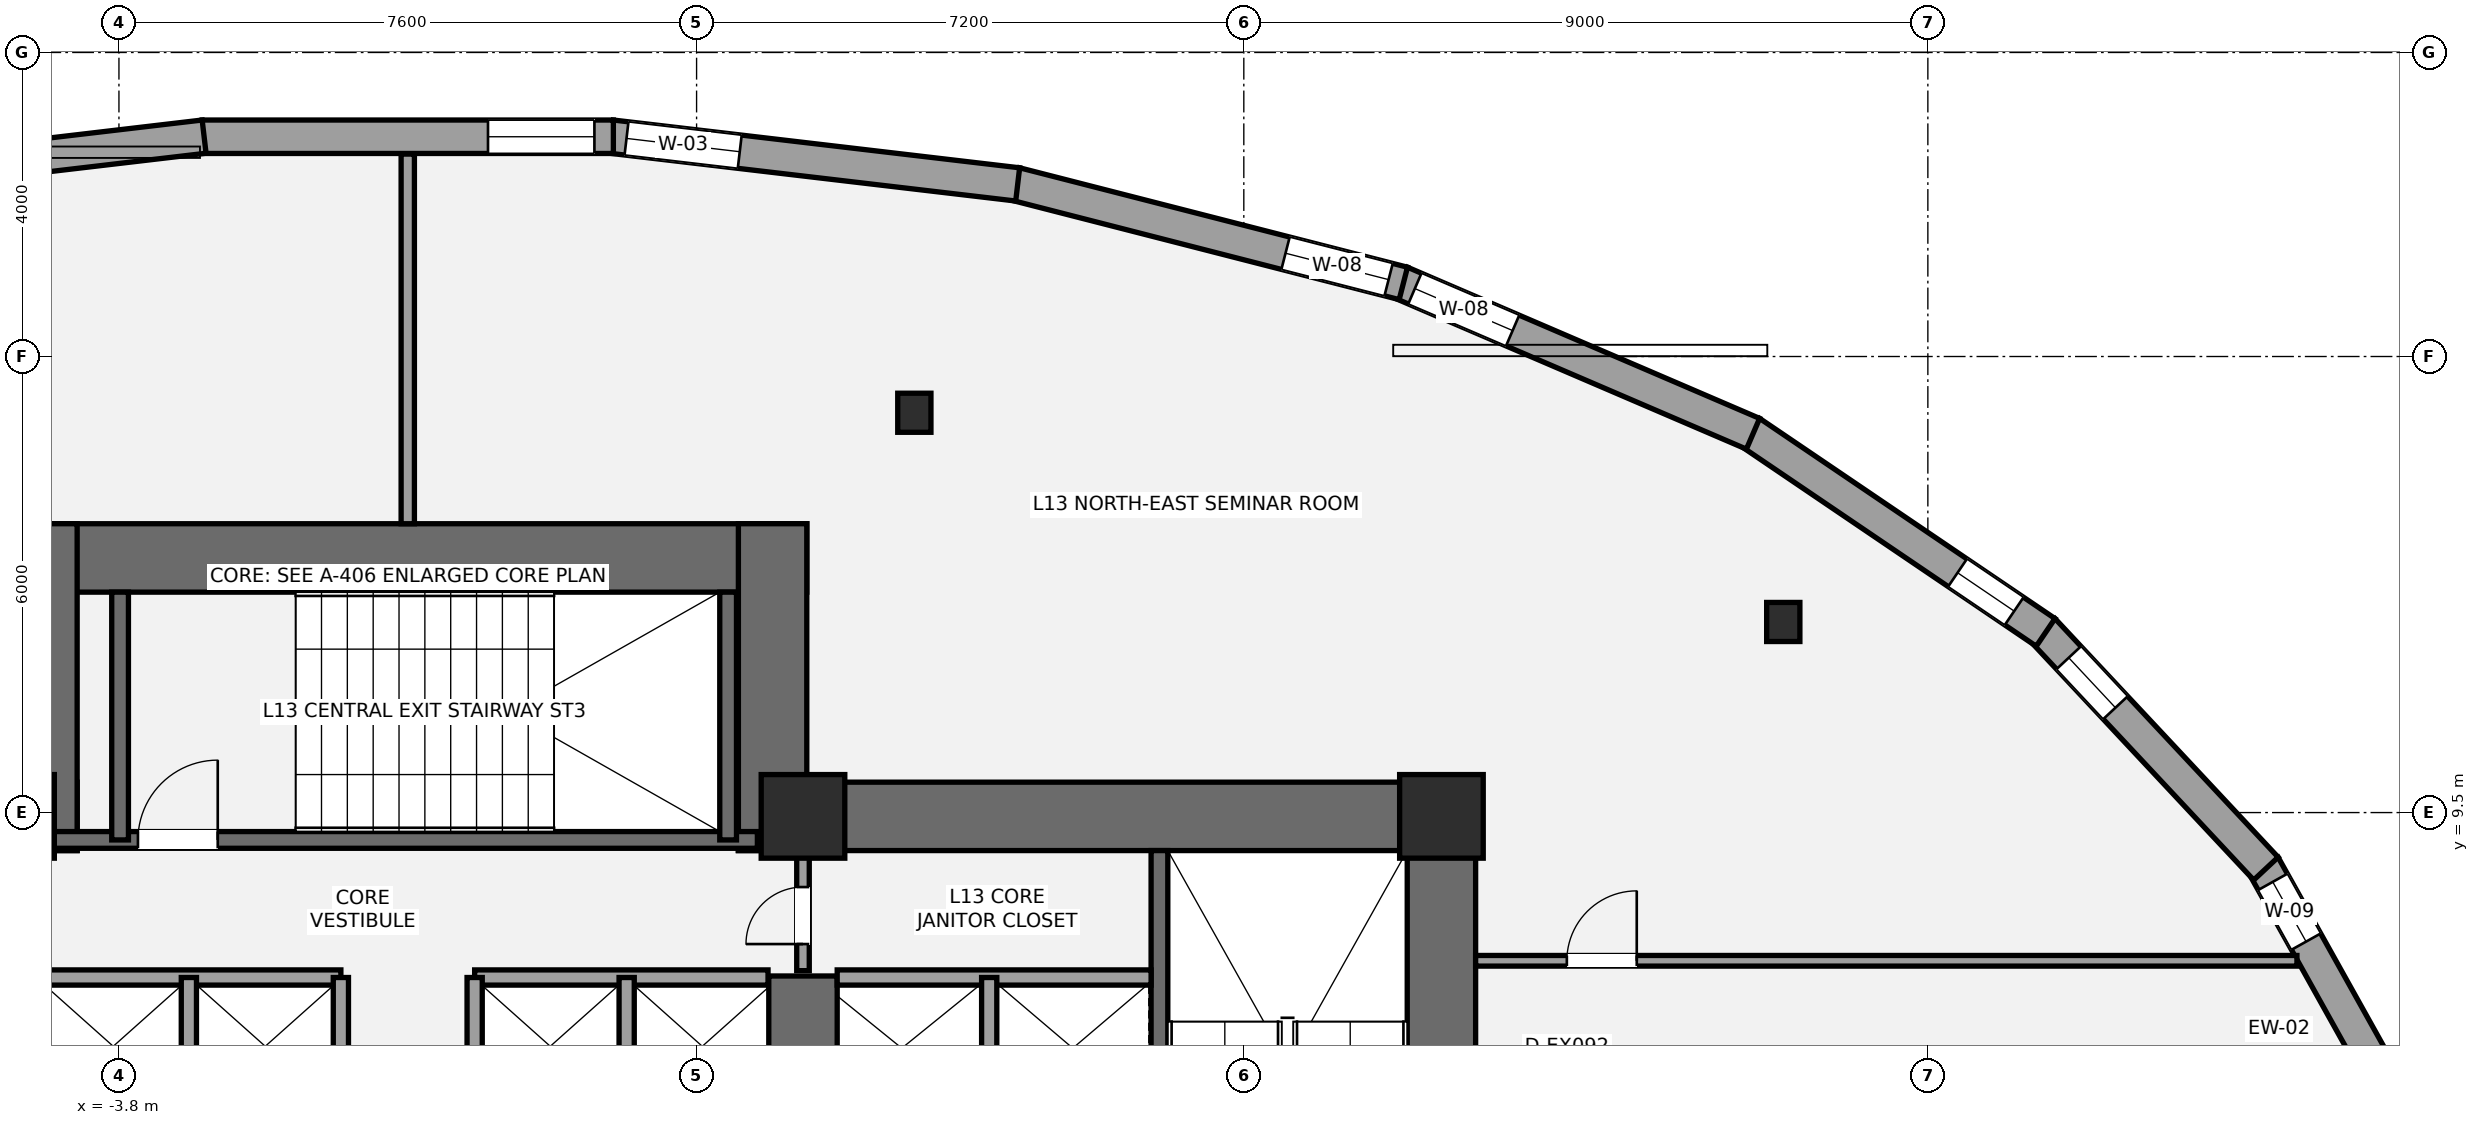
"""IFC4 building model, lengths in metres.
Left out: names, types, materials, properties, quantities, classifications, styles, units other than length and angle.
Written with IfcOpenShell. Run it as: python <this file> out.ifc"""

import sys

from ifc_helpers import new_model, si_unit, direction, frame, frame_2d, origin, origin_2d, place, context, subcontext, project, spatial, rectangle, i_section, extrude, element, fill, save


model = new_model("IFC4")
c1 = context("Model", 3, precision=1e-05, world=origin(), true_north=direction((0.0, 1.0)))
c2 = subcontext(c1, "Body", "Model", "MODEL_VIEW")
j1 = project(units=[si_unit("LENGTHUNIT", "METRE"), si_unit("PLANEANGLEUNIT", "RADIAN")], contexts=[c1])
p1 = place(None, origin())
s1 = spatial("IfcSite", under=j1, at=p1, CompositionType="ELEMENT")
p2 = place(p1, origin())
s2 = spatial("IfcBuilding", under=s1, at=p2, CompositionType="ELEMENT")
p3 = place(p2, frame((0.0, 0.0, 52.2)))
s3 = spatial("IfcBuildingStorey", under=s2, at=p3, CompositionType="ELEMENT", Elevation=52.2)
p4 = place(p3, frame((-14.05, 9.45, 0.0), z_axis=(0.0, 0.0, 1.0), x_axis=(1.0, 0.0, 0.0)))
e1 = element("IfcWall", 1, at=p4, inside=s3, PredefinedType="SHEAR", context=c2, shape_type="SweptSolid", body=[
    extrude(rectangle(XDim=9.7, YDim=0.9, at=frame_2d((4.85, 0.0))), origin(), (0.0, 0.0, 1.0), 3.6),
])
p5 = place(p3, frame((13.6, 0.95, 0.0), z_axis=(0.0, 0.0, 1.0), x_axis=(0.0, 1.0, 0.0)))
e2 = element("IfcWall", 2, at=p5, inside=s3, PredefinedType="SHEAR", context=c2, shape_type="SweptSolid", body=[
    extrude(rectangle(XDim=8.95, YDim=0.9, at=frame_2d((4.475, 0.0))), origin(), (0.0, 0.0, 1.0), 3.6),
])
p6 = place(p3, frame((4.35, 9.45, 0.0), z_axis=(0.0, 0.0, 1.0), x_axis=(1.0, 0.0, 0.0)))
e3 = element("IfcWall", 3, at=p6, inside=s3, PredefinedType="SHEAR", context=c2, shape_type="SweptSolid", body=[
    extrude(rectangle(XDim=9.7, YDim=0.9, at=frame_2d((4.85, 0.0))), origin(), (0.0, 0.0, 1.0), 3.6),
])
p7 = place(p3, frame((5.2, 5.35, 0.0), z_axis=(0.0, 0.0, 1.0), x_axis=(0.0, 1.0, 0.0)))
e4 = element("IfcWall", 4, at=p7, inside=s3, PredefinedType="SHEAR", context=c2, shape_type="SweptSolid", body=[
    extrude(rectangle(XDim=2.0, YDim=0.9, at=frame_2d((1.0, 0.0))), origin(), (0.0, 0.0, 1.0), 3.6),
])
p8 = place(p3, frame((9.89, 1.85, 0.0), z_axis=(0.0, 0.0, 1.0), x_axis=(0.0, 1.0, 0.0)))
e5 = element("IfcWall", 5, at=p8, inside=s3, PredefinedType="SHEAR", context=c2, shape_type="SweptSolid", body=[
    extrude(rectangle(XDim=7.15, YDim=0.22, at=frame_2d((3.575, 0.0))), origin(), (0.0, 0.0, 1.0), 3.6),
])
p9 = place(p3, frame((-5.25, 12.85, 0.0), z_axis=(0.0, 0.0, 1.0), x_axis=(1.0, 0.0, 0.0)))
e6 = element("IfcWall", 6, at=p9, inside=s3, PredefinedType="SHEAR", context=c2, shape_type="SweptSolid", body=[
    extrude(rectangle(XDim=10.5, YDim=0.9, at=frame_2d((5.25, 0.0))), origin(), (0.0, 0.0, 1.0), 3.6),
])
for number, where, z_axis, x_axis in (
    (7, (-4.8, 9.0, 0.0), (0.0, 0.0, 1.0), (0.0, 1.0, 0.0)),
    (8, (4.8, 9.0, 0.0), (0.0, 0.0, 1.0), (0.0, 1.0, 0.0)),
):
    element("IfcWall", number, at=place(p3, frame(where, z_axis=z_axis, x_axis=x_axis)), inside=s3, PredefinedType="SHEAR", context=c2, shape_type="SweptSolid", body=[
        extrude(rectangle(XDim=4.3, YDim=0.9, at=frame_2d((2.15, 0.0))), origin(), (0.0, 0.0, 1.0), 3.6),
    ])
p10 = place(p3, frame((-4.7, 9.14, 0.0), z_axis=(0.0, 0.0, 1.0), x_axis=(1.0, 0.0, 0.0)))
e9 = element("IfcWall", 9, at=p10, inside=s3, PredefinedType="SHEAR", context=c2, shape_type="SweptSolid", body=[
    extrude(rectangle(XDim=9.3, YDim=0.22, at=frame_2d((4.65, 0.0))), origin(), (0.0, 0.0, 1.0), 3.6),
])
p11 = place(p10, frame((1.15, 0.0, 0.0)))
e10 = element("IfcOpeningElement", 10, at=p11, cuts=e9, PredefinedType="OPENING", context=c2, shape_type="SweptSolid", body=[
    extrude(rectangle(XDim=1.05, YDim=2.15, at=frame_2d((0.525, 1.075))), frame((0.0, 0.12, 0.0), z_axis=(0.0, -1.0, 0.0), x_axis=(1.0, 0.0, 0.0)), (0.0, 0.0, 1.0), 0.24),
])
for number, where, z_axis, x_axis in (
    (11, (-3.785, 9.14, 0.0), (0.0, 0.0, 1.0), (0.0, 1.0, 0.0)),
    (12, (4.215, 9.14, 0.0), (0.0, 0.0, 1.0), (0.0, 1.0, 0.0)),
):
    element("IfcWall", number, at=place(p3, frame(where, z_axis=z_axis, x_axis=x_axis)), inside=s3, PredefinedType="SHEAR", context=c2, shape_type="SweptSolid", body=[
        extrude(rectangle(XDim=3.26, YDim=0.22, at=frame_2d((1.63, 0.0))), origin(), (0.0, 0.0, 1.0), 3.6),
    ])
for number, where, z_axis, x_axis in (
    (13, (-5.2, 9.45, 0.0), (0.0, 0.0, 1.0), (1.0, 0.0, 0.0)),
    (14, (5.2, 9.45, 0.0), (0.0, 0.0, 1.0), (1.0, 0.0, 0.0)),
    (15, (13.6, 9.45, 0.0), (0.0, 0.0, 1.0), (1.0, 0.0, 0.0)),
):
    element("IfcColumn", number, at=place(p3, frame(where, z_axis=z_axis, x_axis=x_axis)), inside=s3, PredefinedType="COLUMN", context=c2, shape_type="SweptSolid", body=[
        extrude(rectangle(XDim=1.1, YDim=1.1, at=origin_2d()), origin(), (0.0, 0.0, 1.0), 3.6),
    ])
for number, where, z_axis, x_axis in (
    (16, (18.098, 12.007, 0.0), (0.0, 0.0, 1.0), (1.0, 0.0, 0.0)),
    (17, (6.665, 14.76, 0.0), (0.0, 0.0, 1.0), (1.0, 0.0, 0.0)),
):
    element("IfcColumn", number, at=place(p3, frame(where, z_axis=z_axis, x_axis=x_axis)), inside=s3, PredefinedType="COLUMN", context=c2, shape_type="SweptSolid", body=[
        extrude(i_section(OverallWidth=0.437, OverallDepth=0.514, WebThickness=0.061, FlangeThickness=0.097, at=origin_2d()), origin(), (0.0, 0.0, 1.0), 3.6),
    ])
p12 = place(p3, frame((24.416, 8.806, 0.0), z_axis=(0.0, 0.0, 1.0), x_axis=(0.487369438963, -0.873195871477, 0.0)))
e18 = element("IfcWall", 18, at=p12, inside=s3, PredefinedType="STANDARD", context=c2, shape_type="SweptSolid", body=[
    extrude(rectangle(XDim=3.96, YDim=0.44, at=frame_2d((1.98, 0.0))), origin(), (0.0, 0.0, 1.0), 2.533),
])
p13 = place(p12, frame((0.249, 0.0, 0.92)))
e19 = element("IfcOpeningElement", 19, at=p13, cuts=e18, PredefinedType="OPENING", context=c2, shape_type="SweptSolid", body=[
    extrude(rectangle(XDim=0.9, YDim=1.35, at=frame_2d((0.45, 0.675))), frame((0.0, 0.23, 0.0), z_axis=(0.0, -1.0, 0.0), x_axis=(1.0, 0.0, 0.0)), (0.0, 0.0, 1.0), 0.46),
])
p14 = place(p3, frame((21.512, 11.902, 0.0), z_axis=(0.0, 0.0, 1.0), x_axis=(0.68299392258, -0.730424056093, 0.0)))
e20 = element("IfcWall", 20, at=p14, inside=s3, PredefinedType="STANDARD", context=c2, shape_type="SweptSolid", body=[
    extrude(rectangle(XDim=4.298, YDim=0.44, at=frame_2d((2.149, 0.0))), origin(), (0.0, 0.0, 1.0), 2.533),
])
p15 = place(p14, frame((0.5, 0.0, 0.58)))
e21 = element("IfcOpeningElement", 21, at=p15, cuts=e20, PredefinedType="OPENING", context=c2, shape_type="SweptSolid", body=[
    extrude(rectangle(XDim=0.9, YDim=1.35, at=frame_2d((0.45, 0.675))), frame((0.0, 0.23, 0.0), z_axis=(0.0, -1.0, 0.0), x_axis=(1.0, 0.0, 0.0)), (0.0, 0.0, 1.0), 0.46),
])
p16 = place(p3, frame((17.663, 14.504, 0.0), z_axis=(0.0, 0.0, 1.0), x_axis=(0.827825981515, -0.560984976919, 0.0)))
e22 = element("IfcWall", 22, at=p16, inside=s3, PredefinedType="STANDARD", context=c2, shape_type="SweptSolid", body=[
    extrude(rectangle(XDim=4.695, YDim=0.44, at=frame_2d((2.347, 0.0))), origin(), (0.0, 0.0, 1.0), 2.533),
])
p17 = place(p16, frame((3.295, 0.0, 0.58)))
e23 = element("IfcOpeningElement", 23, at=p17, cuts=e22, PredefinedType="OPENING", context=c2, shape_type="SweptSolid", body=[
    extrude(rectangle(XDim=0.9, YDim=1.35, at=frame_2d((0.45, 0.675))), frame((0.0, 0.23, 0.0), z_axis=(0.0, -1.0, 0.0), x_axis=(1.0, 0.0, 0.0)), (0.0, 0.0, 1.0), 0.46),
])
p18 = place(p3, frame((13.067, 16.473, 0.0), z_axis=(0.0, 0.0, 1.0), x_axis=(0.918881850071, -0.394532819433, 0.0)))
e24 = element("IfcWall", 24, at=p18, inside=s3, PredefinedType="STANDARD", context=c2, shape_type="SweptSolid", body=[
    extrude(rectangle(XDim=5.042, YDim=0.44, at=frame_2d((2.521, 0.0))), origin(), (0.0, 0.0, 1.0), 2.533),
])
p19 = place(p18, frame((0.2, 0.0, 0.58)))
e25 = element("IfcOpeningElement", 25, at=p19, cuts=e24, PredefinedType="OPENING", context=c2, shape_type="SweptSolid", body=[
    extrude(rectangle(XDim=1.4, YDim=1.55, at=frame_2d((0.7, 0.775))), frame((0.0, 0.23, 0.0), z_axis=(0.0, -1.0, 0.0), x_axis=(1.0, 0.0, 0.0)), (0.0, 0.0, 1.0), 0.46),
])
p20 = place(p3, frame((7.996, 17.77, 0.0), z_axis=(0.0, 0.0, 1.0), x_axis=(0.968705592422, -0.248212560542, 0.0)))
e26 = element("IfcWall", 26, at=p20, inside=s3, PredefinedType="STANDARD", context=c2, shape_type="SweptSolid", body=[
    extrude(rectangle(XDim=5.268, YDim=0.44, at=frame_2d((2.634, 0.0))), origin(), (0.0, 0.0, 1.0), 2.533),
])
p21 = place(p20, frame((3.668, 0.0, 0.45)))
e27 = element("IfcOpeningElement", 27, at=p21, cuts=e26, PredefinedType="OPENING", context=c2, shape_type="SweptSolid", body=[
    extrude(rectangle(XDim=1.4, YDim=1.55, at=frame_2d((0.7, 0.775))), frame((0.0, 0.23, 0.0), z_axis=(0.0, -1.0, 0.0), x_axis=(1.0, 0.0, 0.0)), (0.0, 0.0, 1.0), 0.46),
])
p22 = place(p3, frame((2.679, 18.393, 0.0), z_axis=(0.0, 0.0, 1.0), x_axis=(0.993159890371, -0.116762289112, 0.0)))
e28 = element("IfcWall", 28, at=p22, inside=s3, PredefinedType="STANDARD", context=c2, shape_type="SweptSolid", body=[
    extrude(rectangle(XDim=5.382, YDim=0.44, at=frame_2d((2.691, 0.0))), origin(), (0.0, 0.0, 1.0), 2.533),
])
p23 = place(p22, frame((0.2, 0.0, 0.48)))
e29 = element("IfcOpeningElement", 29, at=p23, cuts=e28, PredefinedType="OPENING", context=c2, shape_type="SweptSolid", body=[
    extrude(rectangle(XDim=1.5, YDim=1.7, at=frame_2d((0.75, 0.85))), frame((0.0, 0.23, 0.0), z_axis=(0.0, -1.0, 0.0), x_axis=(1.0, 0.0, 0.0)), (0.0, 0.0, 1.0), 0.46),
])
p24 = place(p3, frame((-2.705, 18.391, 0.0), z_axis=(0.0, 0.0, 1.0), x_axis=(1.0, 0.0, 0.0)))
e30 = element("IfcWall", 30, at=p24, inside=s3, PredefinedType="STANDARD", context=c2, shape_type="SweptSolid", body=[
    extrude(rectangle(XDim=5.41, YDim=0.44, at=frame_2d((2.705, 0.0))), origin(), (0.0, 0.0, 1.0), 2.533),
])
p25 = place(p24, frame((3.761, 0.0, 0.58)))
e31 = element("IfcOpeningElement", 31, at=p25, cuts=e30, PredefinedType="OPENING", context=c2, shape_type="SweptSolid", body=[
    extrude(rectangle(XDim=1.4, YDim=1.55, at=frame_2d((0.7, 0.775))), frame((0.0, 0.23, 0.0), z_axis=(0.0, -1.0, 0.0), x_axis=(1.0, 0.0, 0.0)), (0.0, 0.0, 1.0), 0.46),
])
p26 = place(p3, frame((-8.025, 17.764, 0.0), z_axis=(0.0, 0.0, 1.0), x_axis=(0.993159890371, 0.116762289112, 0.0)))
e32 = element("IfcWall", 32, at=p26, inside=s3, PredefinedType="STANDARD", context=c2, shape_type="SweptSolid", body=[
    extrude(rectangle(XDim=5.382, YDim=0.44, at=frame_2d((2.691, 0.0))), origin(), (0.0, 0.0, 1.0), 2.533),
])
p27 = place(p26, frame((0.25, 0.0, 0.45)))
e33 = element("IfcOpeningElement", 33, at=p27, cuts=e32, PredefinedType="OPENING", context=c2, shape_type="SweptSolid", body=[
    extrude(rectangle(XDim=1.4, YDim=1.55, at=frame_2d((0.7, 0.775))), frame((0.0, 0.23, 0.0), z_axis=(0.0, -1.0, 0.0), x_axis=(1.0, 0.0, 0.0)), (0.0, 0.0, 1.0), 0.46),
])
p28 = place(p3, frame((5.65, 7.33, 0.0), z_axis=(0.0, 0.0, 1.0), x_axis=(1.0, 0.0, 0.0)))
e34 = element("IfcWall", 34, at=p28, inside=s3, PredefinedType="SOLIDWALL", context=c2, shape_type="SweptSolid", body=[
    extrude(rectangle(XDim=4.13, YDim=0.2, at=frame_2d((2.065, 0.0))), origin(), (0.0, 0.0, 1.0), 3.4),
])
p29 = place(p3, frame((7.65, 5.47, 0.0), z_axis=(0.0, 0.0, 1.0), x_axis=(0.0, 1.0, 0.0)))
e35 = element("IfcWall", 35, at=p29, inside=s3, PredefinedType="SOLIDWALL", context=c2, shape_type="SweptSolid", body=[
    extrude(rectangle(XDim=1.86, YDim=0.2, at=frame_2d((0.93, 0.0))), origin(), (0.0, 0.0, 1.0), 3.4),
])
for number, where, z_axis, x_axis in (
    (36, (-4.74, 7.33, 0.0), (0.0, 0.0, 1.0), (1.0, 0.0, 0.0)),
    (37, (0.88, 7.33, 0.0), (0.0, 0.0, 1.0), (1.0, 0.0, 0.0)),
):
    element("IfcWall", number, at=place(p3, frame(where, z_axis=z_axis, x_axis=x_axis)), inside=s3, PredefinedType="SOLIDWALL", context=c2, shape_type="SweptSolid", body=[
        extrude(rectangle(XDim=3.86, YDim=0.2, at=frame_2d((1.93, 0.0))), origin(), (0.0, 0.0, 1.0), 3.4),
    ])
for number, where, z_axis, x_axis in (
    (38, (-2.88, 5.52, 0.0), (0.0, 0.0, 1.0), (0.0, 1.0, 0.0)),
    (39, (2.88, 5.52, 0.0), (0.0, 0.0, 1.0), (0.0, 1.0, 0.0)),
    (40, (-0.88, 5.52, 0.0), (0.0, 0.0, 1.0), (0.0, 1.0, 0.0)),
    (41, (0.88, 5.52, 0.0), (0.0, 0.0, 1.0), (0.0, 1.0, 0.0)),
):
    element("IfcWall", number, at=place(p3, frame(where, z_axis=z_axis, x_axis=x_axis)), inside=s3, PredefinedType="SOLIDWALL", context=c2, shape_type="SweptSolid", body=[
        extrude(rectangle(XDim=1.81, YDim=0.2, at=frame_2d((0.905, 0.0))), origin(), (0.0, 0.0, 1.0), 3.4),
    ])
p30 = place(p3, frame((5.2, 7.42, 0.0), z_axis=(0.0, 0.0, 1.0), x_axis=(0.0, 1.0, 0.0)))
e42 = element("IfcWall", 42, at=p30, inside=s3, PredefinedType="PARTITIONING", context=c2, shape_type="SweptSolid", body=[
    extrude(rectangle(XDim=1.58, YDim=0.165, at=frame_2d((0.79, 0.0))), origin(), (0.0, 0.0, 1.0), 3.4),
])
p31 = place(p30, frame((0.35, 0.0, 0.0)))
e43 = element("IfcOpeningElement", 43, at=p31, cuts=e42, PredefinedType="OPENING", context=c2, shape_type="SweptSolid", body=[
    extrude(rectangle(XDim=0.75, YDim=2.1, at=frame_2d((0.375, 1.05))), frame((0.0, 0.093, 0.0), z_axis=(0.0, -1.0, 0.0), x_axis=(1.0, 0.0, 0.0)), (0.0, 0.0, 1.0), 0.185),
])
p32 = place(p3, frame((14.05, 7.55, 0.0), z_axis=(0.0, 0.0, 1.0), x_axis=(1.0, 0.0, 0.0)))
e44 = element("IfcWall", 44, at=p32, inside=s3, PredefinedType="PARTITIONING", context=c2, shape_type="SweptSolid", body=[
    extrude(rectangle(XDim=10.806, YDim=0.14, at=frame_2d((5.403, 0.0))), origin(), (0.0, 0.0, 1.0), 2.853),
])
p33 = place(p32, frame((1.2, 0.0, 0.0)))
e45 = element("IfcOpeningElement", 45, at=p33, cuts=e44, PredefinedType="OPENING", context=c2, shape_type="SweptSolid", body=[
    extrude(rectangle(XDim=0.92, YDim=2.15, at=frame_2d((0.46, 1.075))), frame((0.0, 0.08, 0.0), z_axis=(0.0, -1.0, 0.0), x_axis=(1.0, 0.0, 0.0)), (0.0, 0.0, 1.0), 0.16),
])
p34 = place(p3, frame((0.0, 13.3, 0.0), z_axis=(0.0, 0.0, 1.0), x_axis=(0.0, 1.0, 0.0)))
e46 = element("IfcWall", 46, at=p34, inside=s3, PredefinedType="PARTITIONING", context=c2, shape_type="SweptSolid", body=[
    extrude(rectangle(XDim=4.863, YDim=0.175, at=frame_2d((2.432, 0.0))), origin(), (0.0, 0.0, 1.0), 3.4),
])
p35 = place(p13, origin())
e47 = element("IfcWindow", 47, at=p35, inside=s3, PartitioningType="SINGLE_PANEL", PredefinedType="WINDOW", context=c2, shape_type="SweptSolid", body=[
    extrude(rectangle(XDim=0.9, YDim=1.35, at=frame_2d((0.45, 0.675))), frame((0.0, -0.01, 0.0), z_axis=(0.0, -1.0, 0.0), x_axis=(1.0, 0.0, 0.0)), (0.0, 0.0, 1.0), 0.06),
])
fill(e19, e47)
p36 = place(p15, origin())
e48 = element("IfcWindow", 48, at=p36, inside=s3, PartitioningType="SINGLE_PANEL", PredefinedType="WINDOW", context=c2, shape_type="SweptSolid", body=[
    extrude(rectangle(XDim=0.9, YDim=1.35, at=frame_2d((0.45, 0.675))), frame((0.0, -0.01, 0.0), z_axis=(0.0, -1.0, 0.0), x_axis=(1.0, 0.0, 0.0)), (0.0, 0.0, 1.0), 0.06),
])
fill(e21, e48)
p37 = place(p17, origin())
e49 = element("IfcWindow", 49, at=p37, inside=s3, PartitioningType="SINGLE_PANEL", PredefinedType="WINDOW", context=c2, shape_type="SweptSolid", body=[
    extrude(rectangle(XDim=0.9, YDim=1.35, at=frame_2d((0.45, 0.675))), frame((0.0, -0.01, 0.0), z_axis=(0.0, -1.0, 0.0), x_axis=(1.0, 0.0, 0.0)), (0.0, 0.0, 1.0), 0.06),
])
fill(e23, e49)
p38 = place(p19, origin())
e50 = element("IfcWindow", 50, at=p38, inside=s3, PartitioningType="SINGLE_PANEL", PredefinedType="WINDOW", context=c2, shape_type="SweptSolid", body=[
    extrude(rectangle(XDim=1.4, YDim=1.55, at=frame_2d((0.7, 0.775))), frame((0.0, -0.01, 0.0), z_axis=(0.0, -1.0, 0.0), x_axis=(1.0, 0.0, 0.0)), (0.0, 0.0, 1.0), 0.06),
])
fill(e25, e50)
p39 = place(p21, origin())
e51 = element("IfcWindow", 51, at=p39, inside=s3, PartitioningType="SINGLE_PANEL", PredefinedType="WINDOW", context=c2, shape_type="SweptSolid", body=[
    extrude(rectangle(XDim=1.4, YDim=1.55, at=frame_2d((0.7, 0.775))), frame((0.0, -0.01, 0.0), z_axis=(0.0, -1.0, 0.0), x_axis=(1.0, 0.0, 0.0)), (0.0, 0.0, 1.0), 0.06),
])
fill(e27, e51)
p40 = place(p23, origin())
e52 = element("IfcWindow", 52, at=p40, inside=s3, PartitioningType="SINGLE_PANEL", PredefinedType="WINDOW", context=c2, shape_type="SweptSolid", body=[
    extrude(rectangle(XDim=1.5, YDim=1.7, at=frame_2d((0.75, 0.85))), frame((0.0, -0.01, 0.0), z_axis=(0.0, -1.0, 0.0), x_axis=(1.0, 0.0, 0.0)), (0.0, 0.0, 1.0), 0.06),
])
fill(e29, e52)
p41 = place(p25, origin())
e53 = element("IfcWindow", 53, at=p41, inside=s3, PartitioningType="SINGLE_PANEL", PredefinedType="WINDOW", context=c2, shape_type="SweptSolid", body=[
    extrude(rectangle(XDim=1.4, YDim=1.55, at=frame_2d((0.7, 0.775))), frame((0.0, -0.01, 0.0), z_axis=(0.0, -1.0, 0.0), x_axis=(1.0, 0.0, 0.0)), (0.0, 0.0, 1.0), 0.06),
])
fill(e31, e53)
p42 = place(p11, origin())
e54 = element("IfcDoor", 54, at=p42, inside=s3, OperationType="SINGLE_SWING_RIGHT", PredefinedType="DOOR", context=c2, shape_type="SweptSolid", body=[
    extrude(rectangle(XDim=1.05, YDim=2.15, at=frame_2d((0.525, 1.075))), frame((0.0, 0.025, 0.0), z_axis=(0.0, -1.0, 0.0), x_axis=(1.0, 0.0, 0.0)), (0.0, 0.0, 1.0), 0.05),
])
fill(e10, e54)
p43 = place(p31, origin())
e55 = element("IfcDoor", 55, at=p43, inside=s3, OperationType="SINGLE_SWING_LEFT", PredefinedType="DOOR", context=c2, shape_type="SweptSolid", body=[
    extrude(rectangle(XDim=0.75, YDim=2.1, at=frame_2d((0.375, 1.05))), frame((0.0, 0.025, 0.0), z_axis=(0.0, -1.0, 0.0), x_axis=(1.0, 0.0, 0.0)), (0.0, 0.0, 1.0), 0.05),
])
fill(e43, e55)
p44 = place(p33, origin())
e56 = element("IfcDoor", 56, at=p44, inside=s3, OperationType="SINGLE_SWING_RIGHT", PredefinedType="DOOR", context=c2, shape_type="SweptSolid", body=[
    extrude(rectangle(XDim=0.92, YDim=2.15, at=frame_2d((0.46, 1.075))), frame((0.0, 0.025, 0.0), z_axis=(0.0, -1.0, 0.0), x_axis=(1.0, 0.0, 0.0)), (0.0, 0.0, 1.0), 0.05),
])
fill(e45, e56)
save(model, sys.argv[1])
